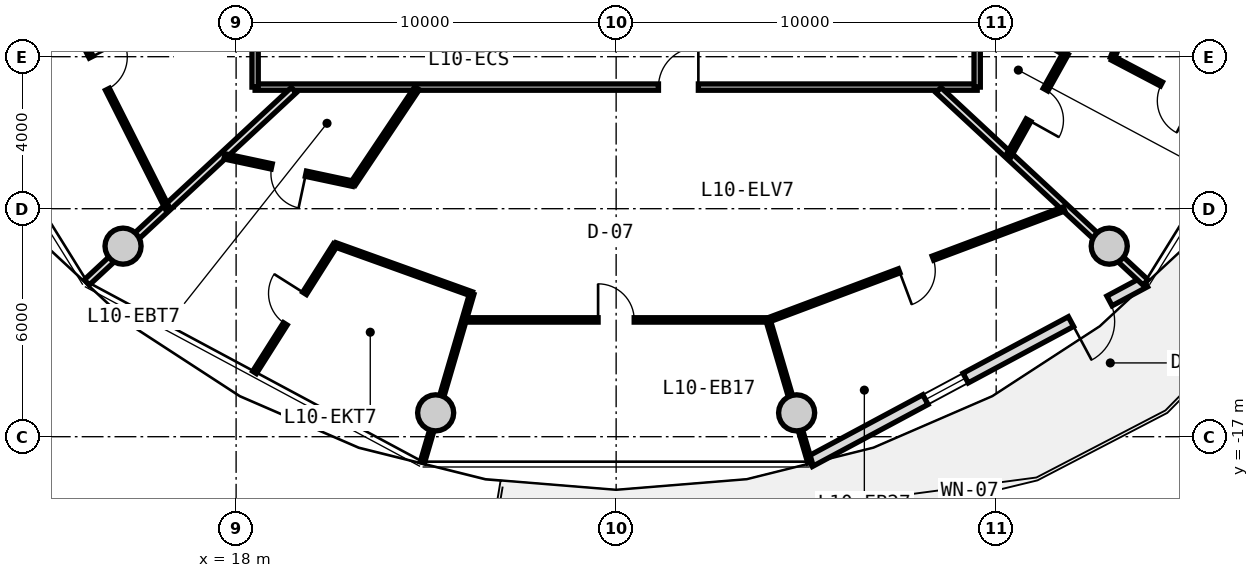
"""IFC4 building model, lengths in metres.
Left out: names, types, materials, properties, quantities, classifications, styles, units other than length and angle.
Written with IfcOpenShell. Run it as: python <this file> out.ifc"""

import sys

from ifc_helpers import new_model, si_unit, direction, frame, frame_2d, origin, origin_2d, place, context, subcontext, project, spatial, rectangle, circle, extrude, source, transform, mapped, element, fill, save


model = new_model("IFC4")
c1 = context("Model", 3, precision=1e-05, world=origin(), true_north=direction((0.0, 1.0)))
c2 = subcontext(c1, "Body", "Model", "MODEL_VIEW")
j1 = project(units=[si_unit("LENGTHUNIT", "METRE"), si_unit("PLANEANGLEUNIT", "RADIAN")], contexts=[c1])
p1 = place(None, origin())
s1 = spatial("IfcSite", under=j1, at=p1, CompositionType="ELEMENT")
p2 = place(p1, origin())
s2 = spatial("IfcBuilding", under=s1, at=p2, CompositionType="ELEMENT")
p3 = place(p2, frame((0.0, 0.0, 36.85)))
s3 = spatial("IfcBuildingStorey", under=s2, at=p3, CompositionType="ELEMENT", Elevation=36.85)
m1 = source(origin(), c2, "Body", "SweptSolid", [
    extrude(circle(Radius=0.475, at=origin_2d()), origin(), (0.0, 0.0, 1.0), 3.05),
])
for number, where, z_axis, x_axis in (
    (1, (15.025, -11.985, 0.0), (0.0, 0.0, 1.0), (1.0, 0.0, 0.0)),
    (2, (23.251, -16.373, 0.0), (0.0, 0.0, 1.0), (1.0, 0.0, 0.0)),
    (3, (32.749, -16.373, 0.0), (0.0, 0.0, 1.0), (1.0, 0.0, 0.0)),
    (4, (40.975, -11.985, 0.0), (0.0, 0.0, 1.0), (1.0, 0.0, 0.0)),
):
    element("IfcColumn", number, at=place(p3, frame(where, z_axis=z_axis, x_axis=x_axis)), inside=s3, PredefinedType="COLUMN", context=c2, shape_type="MappedRepresentation", body=[
        mapped(m1, transform((0.0, 0.0, 0.0), x_axis=(1.0, 0.0, 0.0), y_axis=(0.0, 1.0, 0.0), z_axis=(0.0, 0.0, 1.0), scale=1.0)),
    ])
m2 = source(origin(), c2, "Body", "SweptSolid", [
    extrude(rectangle(XDim=10.011, YDim=0.29, at=frame_2d((5.005, 0.0))), origin(), (0.0, 0.0, 1.0), 2.79),
])
p4 = place(p3, frame((41.916, -12.926, 0.0), z_axis=(0.0, 0.0, 1.0), x_axis=(-0.881272505317, -0.472608475773, 0.0)))
e5 = element("IfcWall", 5, at=p4, inside=s3, PredefinedType="SOLIDWALL", context=c2, shape_type="MappedRepresentation", body=[
    mapped(m2, transform((0.0, 0.0, 0.0), x_axis=(1.0, 0.0, 0.0), y_axis=(0.0, 1.0, 0.0), z_axis=(0.0, 0.0, 1.0), scale=1.0)),
])
p5 = place(p4, frame((1.06, 0.0, 0.0)))
e6 = element("IfcOpeningElement", 6, at=p5, cuts=e5, PredefinedType="OPENING", context=c2, shape_type="SweptSolid", body=[
    extrude(rectangle(XDim=1.15, YDim=2.25, at=frame_2d((0.575, 1.125))), frame((0.0, 0.155, 0.0), z_axis=(0.0, -1.0, 0.0), x_axis=(1.0, 0.0, 0.0)), (0.0, 0.0, 1.0), 0.31),
])
p6 = place(p4, frame((5.355, 0.0, 0.85)))
e7 = element("IfcOpeningElement", 7, at=p6, cuts=e5, PredefinedType="OPENING", context=c2, shape_type="SweptSolid", body=[
    extrude(rectangle(XDim=1.2, YDim=1.5, at=frame_2d((0.6, 0.75))), frame((0.0, 0.155, 0.0), z_axis=(0.0, -1.0, 0.0), x_axis=(1.0, 0.0, 0.0)), (0.0, 0.0, 1.0), 0.31),
])
m3 = source(origin(), c2, "Body", "SweptSolid", [
    extrude(rectangle(XDim=19.0, YDim=0.165, at=frame_2d((9.5, 0.0))), origin(), (0.0, 0.0, 1.0), 2.775),
])
p7 = place(p3, frame((37.5, -7.8, 0.0), z_axis=(0.0, 0.0, 1.0), x_axis=(-1.0, 0.0, 0.0)))
e8 = element("IfcWall", 8, at=p7, inside=s3, PredefinedType="PARTITIONING", context=c2, shape_type="MappedRepresentation", body=[
    mapped(m3, transform((0.0, 0.0, 0.0), x_axis=(1.0, 0.0, 0.0), y_axis=(0.0, 1.0, 0.0), z_axis=(0.0, 0.0, 1.0), scale=1.0)),
])
p8 = place(p7, frame((7.336, 0.0, 0.0)))
e9 = element("IfcOpeningElement", 9, at=p8, cuts=e8, PredefinedType="OPENING", context=c2, shape_type="SweptSolid", body=[
    extrude(rectangle(XDim=1.05, YDim=2.15, at=frame_2d((0.525, 1.075))), frame((0.0, 0.093, 0.0), z_axis=(0.0, -1.0, 0.0), x_axis=(1.0, 0.0, 0.0)), (0.0, 0.0, 1.0), 0.185),
])
m4 = source(origin(), c2, "Body", "SweptSolid", [
    extrude(rectangle(XDim=15.6, YDim=0.165, at=frame_2d((7.8, 0.0))), origin(), (0.0, 0.0, 1.0), 2.775),
])
p9 = place(p3, frame((18.5, -7.8, 0.0), z_axis=(0.0, 0.0, 1.0), x_axis=(0.0, 1.0, 0.0)))
e10 = element("IfcWall", 10, at=p9, inside=s3, PredefinedType="PARTITIONING", context=c2, shape_type="MappedRepresentation", body=[
    mapped(m4, transform((0.0, 0.0, 0.0), x_axis=(1.0, 0.0, 0.0), y_axis=(0.0, 1.0, 0.0), z_axis=(0.0, 0.0, 1.0), scale=1.0)),
])
p10 = place(p9, frame((12.141, 0.0, 0.0)))
e11 = element("IfcOpeningElement", 11, at=p10, cuts=e10, PredefinedType="OPENING", context=c2, shape_type="SweptSolid", body=[
    extrude(rectangle(XDim=1.25, YDim=2.2, at=frame_2d((0.625, 1.1))), frame((0.0, 0.093, 0.0), z_axis=(0.0, -1.0, 0.0), x_axis=(1.0, 0.0, 0.0)), (0.0, 0.0, 1.0), 0.185),
])
p11 = place(p9, frame((3.63, 0.0, 0.0)))
e12 = element("IfcOpeningElement", 12, at=p11, cuts=e10, PredefinedType="OPENING", context=c2, shape_type="SweptSolid", body=[
    extrude(rectangle(XDim=1.05, YDim=2.15, at=frame_2d((0.525, 1.075))), frame((0.0, 0.093, 0.0), z_axis=(0.0, -1.0, 0.0), x_axis=(1.0, 0.0, 0.0)), (0.0, 0.0, 1.0), 0.185),
])
p12 = place(p3, frame((37.5, 7.8, 0.0), z_axis=(0.0, 0.0, 1.0), x_axis=(0.0, -1.0, 0.0)))
e13 = element("IfcWall", 13, at=p12, inside=s3, PredefinedType="PARTITIONING", context=c2, shape_type="MappedRepresentation", body=[
    mapped(m4, transform((0.0, 0.0, 0.0), x_axis=(1.0, 0.0, 0.0), y_axis=(0.0, 1.0, 0.0), z_axis=(0.0, 0.0, 1.0), scale=1.0)),
])
p13 = place(p12, frame((6.269, 0.0, 0.0)))
e14 = element("IfcOpeningElement", 14, at=p13, cuts=e13, PredefinedType="OPENING", context=c2, shape_type="SweptSolid", body=[
    extrude(rectangle(XDim=1.05, YDim=2.15, at=frame_2d((0.525, 1.075))), frame((0.0, 0.093, 0.0), z_axis=(0.0, -1.0, 0.0), x_axis=(1.0, 0.0, 0.0)), (0.0, 0.0, 1.0), 0.185),
])
m5 = source(origin(), c2, "Body", "SweptSolid", [
    extrude(rectangle(XDim=7.435, YDim=0.19, at=frame_2d((3.717, 0.0))), origin(), (0.0, 0.0, 1.0), 2.225),
])
p14 = place(p3, frame((19.517, -7.88, 0.0), z_axis=(0.0, 0.0, 1.0), x_axis=(-0.732651956848, -0.680603489652, 0.0)))
e15 = element("IfcWall", 15, at=p14, inside=s3, PredefinedType="PARTITIONING", context=c2, shape_type="MappedRepresentation", body=[
    mapped(m5, transform((0.0, 0.0, 0.0), x_axis=(1.0, 0.0, 0.0), y_axis=(0.0, 1.0, 0.0), z_axis=(0.0, 0.0, 1.0), scale=1.0)),
])
m6 = source(origin(), c2, "Body", "SweptSolid", [
    extrude(rectangle(XDim=8.018, YDim=0.115, at=frame_2d((4.009, 0.0))), origin(), (0.0, 0.0, 1.0), 2.775),
])
p15 = place(p3, frame((12.596, -3.854, 0.0), z_axis=(0.0, 0.0, 1.0), x_axis=(0.450134355233, -0.89296084026, 0.0)))
e16 = element("IfcWall", 16, at=p15, inside=s3, PredefinedType="PARTITIONING", context=c2, shape_type="MappedRepresentation", body=[
    mapped(m6, transform((0.0, 0.0, 0.0), x_axis=(1.0, 0.0, 0.0), y_axis=(0.0, 1.0, 0.0), z_axis=(0.0, 0.0, 1.0), scale=1.0)),
])
p16 = place(p15, frame((3.534, 0.0, 0.0)))
e17 = element("IfcOpeningElement", 17, at=p16, cuts=e16, PredefinedType="OPENING", context=c2, shape_type="SweptSolid", body=[
    extrude(rectangle(XDim=0.95, YDim=2.1, at=frame_2d((0.475, 1.05))), frame((0.0, 0.067, 0.0), z_axis=(0.0, -1.0, 0.0), x_axis=(1.0, 0.0, 0.0)), (0.0, 0.0, 1.0), 0.135),
])
p17 = place(p3, frame((36.483, -7.88, 0.0), z_axis=(0.0, 0.0, 1.0), x_axis=(0.732651956848, -0.680603489652, 0.0)))
e18 = element("IfcWall", 18, at=p17, inside=s3, PredefinedType="PARTITIONING", context=c2, shape_type="MappedRepresentation", body=[
    mapped(m5, transform((0.0, 0.0, 0.0), x_axis=(1.0, 0.0, 0.0), y_axis=(0.0, 1.0, 0.0), z_axis=(0.0, 0.0, 1.0), scale=1.0)),
])
m7 = source(origin(), c2, "Body", "SweptSolid", [
    extrude(rectangle(XDim=7.993, YDim=0.115, at=frame_2d((3.996, 0.0))), origin(), (0.0, 0.0, 1.0), 2.775),
])
p18 = place(p3, frame((24.004, -13.927, 0.0), z_axis=(0.0, 0.0, 1.0), x_axis=(1.0, 0.0, 0.0)))
e19 = element("IfcWall", 19, at=p18, inside=s3, PredefinedType="PARTITIONING", context=c2, shape_type="MappedRepresentation", body=[
    mapped(m7, transform((0.0, 0.0, 0.0), x_axis=(1.0, 0.0, 0.0), y_axis=(0.0, 1.0, 0.0), z_axis=(0.0, 0.0, 1.0), scale=1.0)),
])
p19 = place(p18, frame((3.521, 0.0, 0.0)))
e20 = element("IfcOpeningElement", 20, at=p19, cuts=e19, PredefinedType="OPENING", context=c2, shape_type="SweptSolid", body=[
    extrude(rectangle(XDim=0.95, YDim=2.1, at=frame_2d((0.475, 1.05))), frame((0.0, 0.067, 0.0), z_axis=(0.0, -1.0, 0.0), x_axis=(1.0, 0.0, 0.0)), (0.0, 0.0, 1.0), 0.135),
])
m8 = source(origin(), c2, "Body", "SweptSolid", [
    extrude(rectangle(XDim=4.625, YDim=0.115, at=frame_2d((2.312, 0.0))), origin(), (0.0, 0.0, 1.0), 2.225),
])
p20 = place(p3, frame((24.201, -13.239, 0.0), z_axis=(0.0, 0.0, 1.0), x_axis=(-0.2810742844, -0.959686014616, 0.0)))
e21 = element("IfcWall", 21, at=p20, inside=s3, PredefinedType="PARTITIONING", context=c2, shape_type="MappedRepresentation", body=[
    mapped(m8, transform((0.0, 0.0, 0.0), x_axis=(1.0, 0.0, 0.0), y_axis=(0.0, 1.0, 0.0), z_axis=(0.0, 0.0, 1.0), scale=1.0)),
])
m9 = source(origin(), c2, "Body", "SweptSolid", [
    extrude(rectangle(XDim=8.32, YDim=0.115, at=frame_2d((4.16, 0.0))), origin(), (0.0, 0.0, 1.0), 2.775),
])
p21 = place(p3, frame((31.997, -13.93, 0.0), z_axis=(0.0, 0.0, 1.0), x_axis=(0.936180763098, 0.351518959382, 0.0)))
e22 = element("IfcWall", 22, at=p21, inside=s3, PredefinedType="PARTITIONING", context=c2, shape_type="MappedRepresentation", body=[
    mapped(m9, transform((0.0, 0.0, 0.0), x_axis=(1.0, 0.0, 0.0), y_axis=(0.0, 1.0, 0.0), z_axis=(0.0, 0.0, 1.0), scale=1.0)),
])
p22 = place(p21, frame((3.685, 0.0, 0.0)))
e23 = element("IfcOpeningElement", 23, at=p22, cuts=e22, PredefinedType="OPENING", context=c2, shape_type="SweptSolid", body=[
    extrude(rectangle(XDim=0.95, YDim=2.1, at=frame_2d((0.475, 1.05))), frame((0.0, 0.067, 0.0), z_axis=(0.0, -1.0, 0.0), x_axis=(1.0, 0.0, 0.0)), (0.0, 0.0, 1.0), 0.135),
])
m10 = source(origin(), c2, "Body", "SweptSolid", [
    extrude(rectangle(XDim=3.905, YDim=0.115, at=frame_2d((1.952, 0.0))), origin(), (0.0, 0.0, 1.0), 2.225),
])
p23 = place(p3, frame((31.997, -13.93, 0.0), z_axis=(0.0, 0.0, 1.0), x_axis=(0.282037692958, -0.959403324859, 0.0)))
e24 = element("IfcWall", 24, at=p23, inside=s3, PredefinedType="PARTITIONING", context=c2, shape_type="MappedRepresentation", body=[
    mapped(m10, transform((0.0, 0.0, 0.0), x_axis=(1.0, 0.0, 0.0), y_axis=(0.0, 1.0, 0.0), z_axis=(0.0, 0.0, 1.0), scale=1.0)),
])
m11 = source(origin(), c2, "Body", "SweptSolid", [
    extrude(rectangle(XDim=3.025, YDim=0.14, at=frame_2d((1.513, 0.0))), origin(), (0.0, 0.0, 1.0), 2.775),
])
p24 = place(p3, frame((22.76, -7.83, 0.0), z_axis=(0.0, 0.0, 1.0), x_axis=(-0.556189165904, -0.831055721195, 0.0)))
e25 = element("IfcWall", 25, at=p24, inside=s3, PredefinedType="PARTITIONING", context=c2, shape_type="MappedRepresentation", body=[
    mapped(m11, transform((0.0, 0.0, 0.0), x_axis=(1.0, 0.0, 0.0), y_axis=(0.0, 1.0, 0.0), z_axis=(0.0, 0.0, 1.0), scale=1.0)),
])
m12 = source(origin(), c2, "Body", "SweptSolid", [
    extrude(rectangle(XDim=3.459, YDim=0.14, at=frame_2d((1.729, 0.0))), origin(), (0.0, 0.0, 1.0), 2.775),
])
p25 = place(p3, frame((21.078, -10.344, 0.0), z_axis=(0.0, 0.0, 1.0), x_axis=(-0.978006468578, 0.208574560815, 0.0)))
e26 = element("IfcWall", 26, at=p25, inside=s3, PredefinedType="PARTITIONING", context=c2, shape_type="MappedRepresentation", body=[
    mapped(m12, transform((0.0, 0.0, 0.0), x_axis=(1.0, 0.0, 0.0), y_axis=(0.0, 1.0, 0.0), z_axis=(0.0, 0.0, 1.0), scale=1.0)),
])
p26 = place(p25, frame((1.27, 0.0, 0.0)))
e27 = element("IfcOpeningElement", 27, at=p26, cuts=e26, PredefinedType="OPENING", context=c2, shape_type="SweptSolid", body=[
    extrude(rectangle(XDim=0.92, YDim=2.1, at=frame_2d((0.46, 1.05))), frame((0.0, 0.08, 0.0), z_axis=(0.0, -1.0, 0.0), x_axis=(1.0, 0.0, 0.0)), (0.0, 0.0, 1.0), 0.16),
])
m13 = source(origin(), c2, "Body", "SweptSolid", [
    extrude(rectangle(XDim=3.974, YDim=0.115, at=frame_2d((1.987, 0.0))), origin(), (0.0, 0.0, 1.0), 2.775),
])
p27 = place(p3, frame((20.611, -11.95, 0.0), z_axis=(0.0, 0.0, 1.0), x_axis=(-0.534810918023, -0.844971764003, 0.0)))
e28 = element("IfcWall", 28, at=p27, inside=s3, PredefinedType="PARTITIONING", context=c2, shape_type="MappedRepresentation", body=[
    mapped(m13, transform((0.0, 0.0, 0.0), x_axis=(1.0, 0.0, 0.0), y_axis=(0.0, 1.0, 0.0), z_axis=(0.0, 0.0, 1.0), scale=1.0)),
])
p28 = place(p27, frame((1.512, 0.0, 0.0)))
e29 = element("IfcOpeningElement", 29, at=p28, cuts=e28, PredefinedType="OPENING", context=c2, shape_type="SweptSolid", body=[
    extrude(rectangle(XDim=0.95, YDim=2.1, at=frame_2d((0.475, 1.05))), frame((0.0, 0.067, 0.0), z_axis=(0.0, -1.0, 0.0), x_axis=(1.0, 0.0, 0.0)), (0.0, 0.0, 1.0), 0.135),
])
m14 = source(origin(), c2, "Body", "SweptSolid", [
    extrude(rectangle(XDim=3.814, YDim=0.115, at=frame_2d((1.907, 0.0))), origin(), (0.0, 0.0, 1.0), 2.775),
])
p29 = place(p3, frame((20.611, -11.95, 0.0), z_axis=(0.0, 0.0, 1.0), x_axis=(0.940935542004, -0.338585743637, 0.0)))
e30 = element("IfcWall", 30, at=p29, inside=s3, PredefinedType="PARTITIONING", context=c2, shape_type="MappedRepresentation", body=[
    mapped(m14, transform((0.0, 0.0, 0.0), x_axis=(1.0, 0.0, 0.0), y_axis=(0.0, 1.0, 0.0), z_axis=(0.0, 0.0, 1.0), scale=1.0)),
])
m15 = source(origin(), c2, "Body", "SweptSolid", [
    extrude(rectangle(XDim=2.669, YDim=0.14, at=frame_2d((1.335, 0.0))), origin(), (0.0, 0.0, 1.0), 2.775),
])
p30 = place(p3, frame((37.53, -5.561, 0.0), z_axis=(0.0, 0.0, 1.0), x_axis=(0.86369928178, -0.50400749067, 0.0)))
e31 = element("IfcWall", 31, at=p30, inside=s3, PredefinedType="PARTITIONING", context=c2, shape_type="MappedRepresentation", body=[
    mapped(m15, transform((0.0, 0.0, 0.0), x_axis=(1.0, 0.0, 0.0), y_axis=(0.0, 1.0, 0.0), z_axis=(0.0, 0.0, 1.0), scale=1.0)),
])
m16 = source(origin(), c2, "Body", "SweptSolid", [
    extrude(rectangle(XDim=3.121, YDim=0.14, at=frame_2d((1.561, 0.0))), origin(), (0.0, 0.0, 1.0), 2.775),
])
p31 = place(p3, frame((39.836, -6.906, 0.0), z_axis=(0.0, 0.0, 1.0), x_axis=(-0.487302357327, -0.873233309342, 0.0)))
e32 = element("IfcWall", 32, at=p31, inside=s3, PredefinedType="PARTITIONING", context=c2, shape_type="MappedRepresentation", body=[
    mapped(m16, transform((0.0, 0.0, 0.0), x_axis=(1.0, 0.0, 0.0), y_axis=(0.0, 1.0, 0.0), z_axis=(0.0, 0.0, 1.0), scale=1.0)),
])
p32 = place(p31, frame((1.101, 0.0, 0.0)))
e33 = element("IfcOpeningElement", 33, at=p32, cuts=e32, PredefinedType="OPENING", context=c2, shape_type="SweptSolid", body=[
    extrude(rectangle(XDim=0.92, YDim=2.1, at=frame_2d((0.46, 1.05))), frame((0.0, 0.08, 0.0), z_axis=(0.0, -1.0, 0.0), x_axis=(1.0, 0.0, 0.0)), (0.0, 0.0, 1.0), 0.16),
])
m17 = source(origin(), c2, "Body", "SweptSolid", [
    extrude(rectangle(XDim=3.864, YDim=0.115, at=frame_2d((1.932, 0.0))), origin(), (0.0, 0.0, 1.0), 2.775),
])
p33 = place(p3, frame((41.06, -7.041, 0.0), z_axis=(0.0, 0.0, 1.0), x_axis=(0.885194959803, -0.465220252289, 0.0)))
e34 = element("IfcWall", 34, at=p33, inside=s3, PredefinedType="PARTITIONING", context=c2, shape_type="MappedRepresentation", body=[
    mapped(m17, transform((0.0, 0.0, 0.0), x_axis=(1.0, 0.0, 0.0), y_axis=(0.0, 1.0, 0.0), z_axis=(0.0, 0.0, 1.0), scale=1.0)),
])
p34 = place(p33, frame((1.457, 0.0, 0.0)))
e35 = element("IfcOpeningElement", 35, at=p34, cuts=e34, PredefinedType="OPENING", context=c2, shape_type="SweptSolid", body=[
    extrude(rectangle(XDim=0.95, YDim=2.1, at=frame_2d((0.475, 1.05))), frame((0.0, 0.067, 0.0), z_axis=(0.0, -1.0, 0.0), x_axis=(1.0, 0.0, 0.0)), (0.0, 0.0, 1.0), 0.135),
])
m18 = source(origin(), c2, "Body", "SweptSolid", [
    extrude(rectangle(XDim=3.685, YDim=0.115, at=frame_2d((1.843, 0.0))), origin(), (0.0, 0.0, 1.0), 2.775),
])
p35 = place(p3, frame((41.06, -7.041, 0.0), z_axis=(0.0, 0.0, 1.0), x_axis=(0.353503632997, 0.935433151785, 0.0)))
e36 = element("IfcWall", 36, at=p35, inside=s3, PredefinedType="PARTITIONING", context=c2, shape_type="MappedRepresentation", body=[
    mapped(m18, transform((0.0, 0.0, 0.0), x_axis=(1.0, 0.0, 0.0), y_axis=(0.0, 1.0, 0.0), z_axis=(0.0, 0.0, 1.0), scale=1.0)),
])
m19 = source(origin(), c2, "Body", "SweptSolid", [
    extrude(rectangle(XDim=1.15, YDim=2.25, at=frame_2d((0.575, 1.125))), frame((0.0, 0.025, 0.0), z_axis=(0.0, -1.0, 0.0), x_axis=(1.0, 0.0, 0.0)), (0.0, 0.0, 1.0), 0.05),
])
p36 = place(p5, origin())
e37 = element("IfcDoor", 37, at=p36, inside=s3, OperationType="SINGLE_SWING_RIGHT", PredefinedType="DOOR", context=c2, shape_type="MappedRepresentation", body=[
    mapped(m19, transform((0.0, 0.0, 0.0), x_axis=(1.0, 0.0, 0.0), y_axis=(0.0, 1.0, 0.0), z_axis=(0.0, 0.0, 1.0), scale=1.0)),
])
fill(e6, e37)
m20 = source(origin(), c2, "Body", "SweptSolid", [
    extrude(rectangle(XDim=1.2, YDim=1.5, at=frame_2d((0.6, 0.75))), frame((0.0, 0.03, 0.0), z_axis=(0.0, -1.0, 0.0), x_axis=(1.0, 0.0, 0.0)), (0.0, 0.0, 1.0), 0.06),
])
p37 = place(p6, origin())
e38 = element("IfcWindow", 38, at=p37, inside=s3, PartitioningType="SINGLE_PANEL", PredefinedType="WINDOW", context=c2, shape_type="MappedRepresentation", body=[
    mapped(m20, transform((0.0, 0.0, 0.0), x_axis=(1.0, 0.0, 0.0), y_axis=(0.0, 1.0, 0.0), z_axis=(0.0, 0.0, 1.0), scale=1.0)),
])
fill(e7, e38)
m21 = source(origin(), c2, "Body", "SweptSolid", [
    extrude(rectangle(XDim=0.95, YDim=2.1, at=frame_2d((0.475, 1.05))), frame((0.0, 0.025, 0.0), z_axis=(0.0, -1.0, 0.0), x_axis=(1.0, 0.0, 0.0)), (0.0, 0.0, 1.0), 0.05),
])
p38 = place(p16, origin())
e39 = element("IfcDoor", 39, at=p38, inside=s3, OperationType="SINGLE_SWING_LEFT", PredefinedType="DOOR", context=c2, shape_type="MappedRepresentation", body=[
    mapped(m21, transform((0.0, 0.0, 0.0), x_axis=(1.0, 0.0, 0.0), y_axis=(0.0, 1.0, 0.0), z_axis=(0.0, 0.0, 1.0), scale=1.0)),
])
fill(e17, e39)
m22 = source(origin(), c2, "Body", "SweptSolid", [
    extrude(rectangle(XDim=1.05, YDim=2.15, at=frame_2d((0.525, 1.075))), frame((0.0, 0.025, 0.0), z_axis=(0.0, -1.0, 0.0), x_axis=(1.0, 0.0, 0.0)), (0.0, 0.0, 1.0), 0.05),
])
p39 = place(p8, frame((1.05, 0.0, 0.0), z_axis=(0.0, 0.0, 1.0), x_axis=(-1.0, 0.0, 0.0)))
e40 = element("IfcDoor", 40, at=p39, inside=s3, OperationType="SINGLE_SWING_RIGHT", PredefinedType="DOOR", context=c2, shape_type="MappedRepresentation", body=[
    mapped(m22, transform((0.0, 0.0, 0.0), x_axis=(1.0, 0.0, 0.0), y_axis=(0.0, 1.0, 0.0), z_axis=(0.0, 0.0, 1.0), scale=1.0)),
])
fill(e9, e40)
m23 = source(origin(), c2, "Body", "SweptSolid", [
    extrude(rectangle(XDim=0.92, YDim=2.1, at=frame_2d((0.46, 1.05))), frame((0.0, 0.025, 0.0), z_axis=(0.0, -1.0, 0.0), x_axis=(1.0, 0.0, 0.0)), (0.0, 0.0, 1.0), 0.05),
])
p40 = place(p26, origin())
e41 = element("IfcDoor", 41, at=p40, inside=s3, OperationType="SINGLE_SWING_LEFT", PredefinedType="DOOR", context=c2, shape_type="MappedRepresentation", body=[
    mapped(m23, transform((0.0, 0.0, 0.0), x_axis=(1.0, 0.0, 0.0), y_axis=(0.0, 1.0, 0.0), z_axis=(0.0, 0.0, 1.0), scale=1.0)),
])
fill(e27, e41)
p41 = place(p28, frame((0.95, 0.0, 0.0), z_axis=(0.0, 0.0, 1.0), x_axis=(-1.0, 0.0, 0.0)))
e42 = element("IfcDoor", 42, at=p41, inside=s3, OperationType="SINGLE_SWING_RIGHT", PredefinedType="DOOR", context=c2, shape_type="MappedRepresentation", body=[
    mapped(m21, transform((0.0, 0.0, 0.0), x_axis=(1.0, 0.0, 0.0), y_axis=(0.0, 1.0, 0.0), z_axis=(0.0, 0.0, 1.0), scale=1.0)),
])
fill(e29, e42)
p42 = place(p19, origin())
e43 = element("IfcDoor", 43, at=p42, inside=s3, OperationType="SINGLE_SWING_LEFT", PredefinedType="DOOR", context=c2, shape_type="MappedRepresentation", body=[
    mapped(m21, transform((0.0, 0.0, 0.0), x_axis=(1.0, 0.0, 0.0), y_axis=(0.0, 1.0, 0.0), z_axis=(0.0, 0.0, 1.0), scale=1.0)),
])
fill(e20, e43)
p43 = place(p22, frame((0.95, 0.0, 0.0), z_axis=(0.0, 0.0, 1.0), x_axis=(-1.0, 0.0, 0.0)))
e44 = element("IfcDoor", 44, at=p43, inside=s3, OperationType="SINGLE_SWING_RIGHT", PredefinedType="DOOR", context=c2, shape_type="MappedRepresentation", body=[
    mapped(m21, transform((0.0, 0.0, 0.0), x_axis=(1.0, 0.0, 0.0), y_axis=(0.0, 1.0, 0.0), z_axis=(0.0, 0.0, 1.0), scale=1.0)),
])
fill(e23, e44)
p44 = place(p32, origin())
e45 = element("IfcDoor", 45, at=p44, inside=s3, OperationType="SINGLE_SWING_RIGHT", PredefinedType="DOOR", context=c2, shape_type="MappedRepresentation", body=[
    mapped(m23, transform((0.0, 0.0, 0.0), x_axis=(1.0, 0.0, 0.0), y_axis=(0.0, 1.0, 0.0), z_axis=(0.0, 0.0, 1.0), scale=1.0)),
])
fill(e33, e45)
p45 = place(p34, frame((0.95, 0.0, 0.0), z_axis=(0.0, 0.0, 1.0), x_axis=(-1.0, 0.0, 0.0)))
e46 = element("IfcDoor", 46, at=p45, inside=s3, OperationType="SINGLE_SWING_LEFT", PredefinedType="DOOR", context=c2, shape_type="MappedRepresentation", body=[
    mapped(m21, transform((0.0, 0.0, 0.0), x_axis=(1.0, 0.0, 0.0), y_axis=(0.0, 1.0, 0.0), z_axis=(0.0, 0.0, 1.0), scale=1.0)),
])
fill(e35, e46)
save(model, sys.argv[1])
